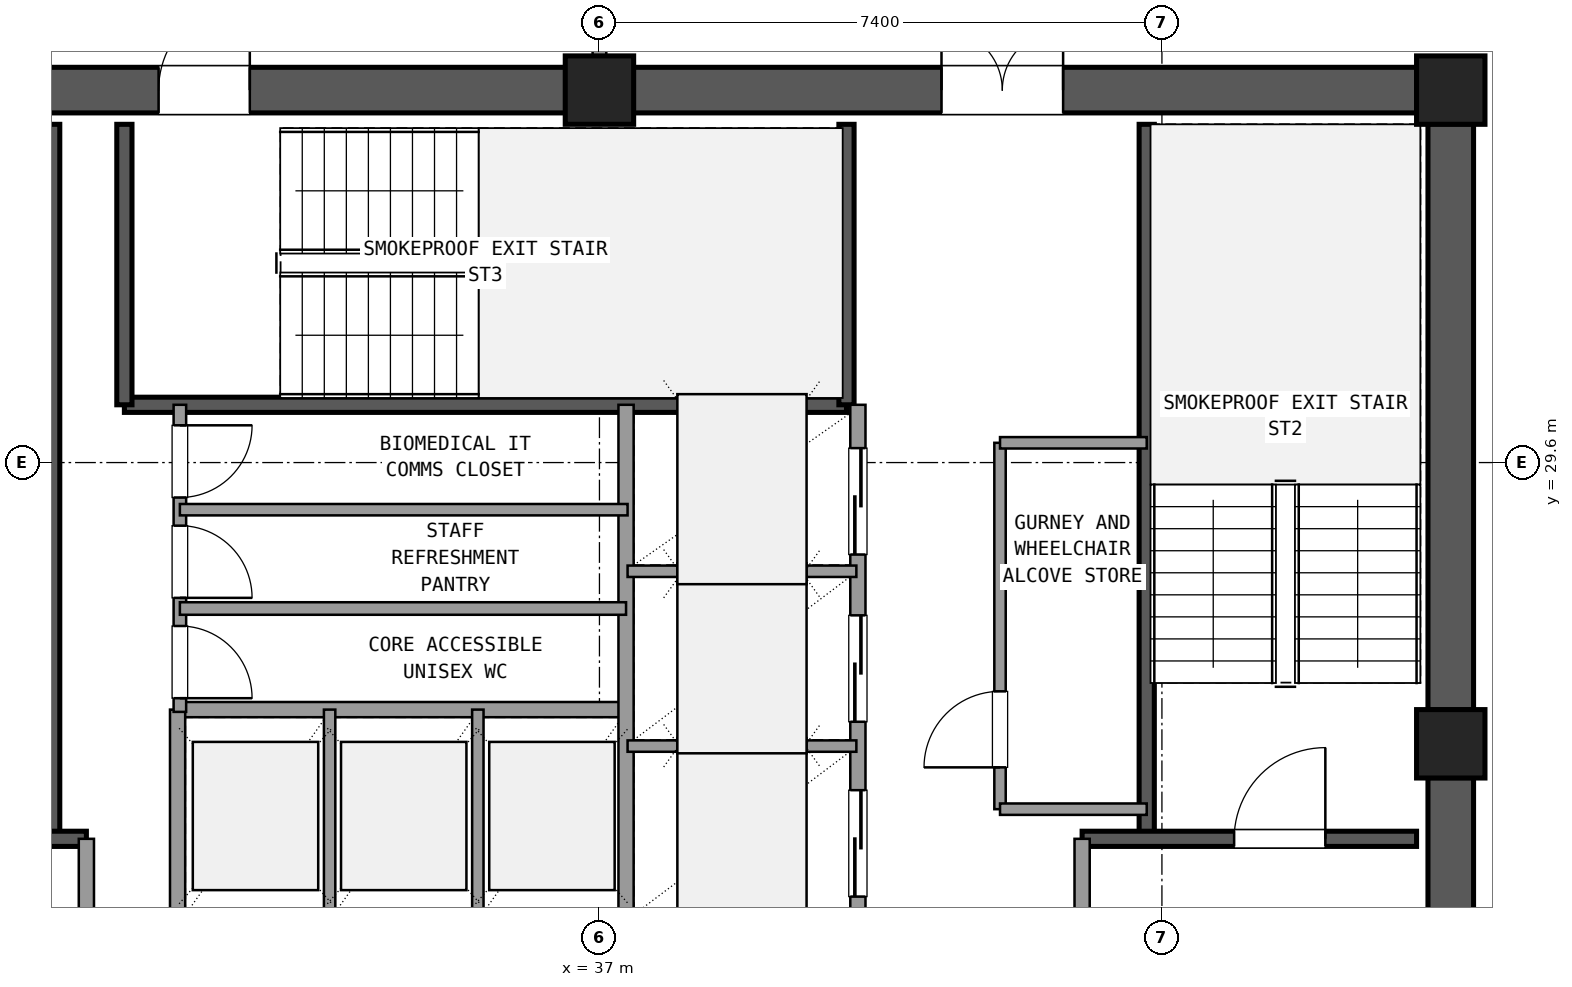
"""IFC4 building model, lengths in metres.
Left out: names, types, materials, properties, quantities, classifications, styles, units other than length and angle.
Written with IfcOpenShell. Run it as: python <this file> out.ifc"""

import sys

from ifc_helpers import new_model, si_unit, direction, frame, frame_2d, origin, origin_2d, place, context, subcontext, project, spatial, rectangle, extrude, element, fill, save


model = new_model("IFC4")
c1 = context("Model", 3, precision=1e-05, world=origin(), true_north=direction((0.0, 1.0)))
c2 = subcontext(c1, "Body", "Model", "MODEL_VIEW")
j1 = project(units=[si_unit("LENGTHUNIT", "METRE"), si_unit("PLANEANGLEUNIT", "RADIAN")], contexts=[c1])
p1 = place(None, origin())
s1 = spatial("IfcSite", under=j1, at=p1, CompositionType="ELEMENT")
p2 = place(p1, origin())
s2 = spatial("IfcBuilding", under=s1, at=p2, CompositionType="ELEMENT")
p3 = place(p2, frame((0.0, 0.0, 246.42)))
s3 = spatial("IfcBuildingStorey", under=s2, at=p3, CompositionType="ELEMENT", Elevation=246.42)
for number, where, z_axis, x_axis in (
    (1, (48.2, 25.9, 0.0), (0.0, 0.0, 1.0), (1.0, 0.0, 0.0)),
    (2, (48.2, 34.5, 0.0), (0.0, 0.0, 1.0), (1.0, 0.0, 0.0)),
    (3, (37.0, 34.5, 0.0), (0.0, 0.0, 1.0), (1.0, 0.0, 0.0)),
):
    element("IfcColumn", number, at=place(p3, frame(where, z_axis=z_axis, x_axis=x_axis)), inside=s3, PredefinedType="COLUMN", context=c2, shape_type="SweptSolid", body=[
        extrude(rectangle(XDim=0.9, YDim=0.9, at=origin_2d()), origin(), (0.0, 0.0, 1.0), 3.6),
    ])
p4 = place(p3, frame((48.2, 17.745, 0.0), z_axis=(0.0, 0.0, 1.0), x_axis=(0.0, 1.0, 0.0)))
e4 = element("IfcWall", 4, at=p4, inside=s3, PredefinedType="SHEAR", context=c2, shape_type="SweptSolid", body=[
    extrude(rectangle(XDim=7.71, YDim=0.6, at=frame_2d((3.855, 0.0))), origin(), (0.0, 0.0, 1.0), 3.32),
])
p5 = place(p4, frame((4.305, 0.0, 0.0)))
e5 = element("IfcOpeningElement", 5, at=p5, cuts=e4, PredefinedType="OPENING", context=c2, shape_type="SweptSolid", body=[
    extrude(rectangle(XDim=1.2, YDim=2.15, at=frame_2d((0.6, 1.075))), frame((0.0, 0.31, 0.0), z_axis=(0.0, -1.0, 0.0), x_axis=(1.0, 0.0, 0.0)), (0.0, 0.0, 1.0), 0.62),
])
p6 = place(p3, frame((48.2, 26.345, 0.0), z_axis=(0.0, 0.0, 1.0), x_axis=(0.0, 1.0, 0.0)))
e6 = element("IfcWall", 6, at=p6, inside=s3, PredefinedType="SHEAR", context=c2, shape_type="SweptSolid", body=[
    extrude(rectangle(XDim=7.71, YDim=0.6, at=frame_2d((3.855, 0.0))), origin(), (0.0, 0.0, 1.0), 3.32),
])
p7 = place(p3, frame((47.755, 34.5, 0.0), z_axis=(0.0, 0.0, 1.0), x_axis=(-1.0, 0.0, 0.0)))
e7 = element("IfcWall", 7, at=p7, inside=s3, PredefinedType="SHEAR", context=c2, shape_type="SweptSolid", body=[
    extrude(rectangle(XDim=10.31, YDim=0.6, at=frame_2d((5.155, 0.0))), origin(), (0.0, 0.0, 1.0), 3.32),
])
p8 = place(p7, frame((4.655, 0.0, 0.0)))
e8 = element("IfcOpeningElement", 8, at=p8, cuts=e7, PredefinedType="OPENING", context=c2, shape_type="SweptSolid", body=[
    extrude(rectangle(XDim=1.6, YDim=2.2, at=frame_2d((0.8, 1.1))), frame((0.0, 0.31, 0.0), z_axis=(0.0, -1.0, 0.0), x_axis=(1.0, 0.0, 0.0)), (0.0, 0.0, 1.0), 0.62),
])
p9 = place(p3, frame((36.555, 34.5, 0.0), z_axis=(0.0, 0.0, 1.0), x_axis=(-1.0, 0.0, 0.0)))
e9 = element("IfcWall", 9, at=p9, inside=s3, PredefinedType="SHEAR", context=c2, shape_type="SweptSolid", body=[
    extrude(rectangle(XDim=10.31, YDim=0.6, at=frame_2d((5.155, 0.0))), origin(), (0.0, 0.0, 1.0), 3.32),
])
p10 = place(p9, frame((4.155, 0.0, 0.0)))
e10 = element("IfcOpeningElement", 10, at=p10, cuts=e9, PredefinedType="OPENING", context=c2, shape_type="SweptSolid", body=[
    extrude(rectangle(XDim=1.2, YDim=2.15, at=frame_2d((0.6, 1.075))), frame((0.0, 0.31, 0.0), z_axis=(0.0, -1.0, 0.0), x_axis=(1.0, 0.0, 0.0)), (0.0, 0.0, 1.0), 0.62),
])
p11 = place(p3, frame((29.8, 24.65, 0.0), z_axis=(0.0, 0.0, 1.0), x_axis=(0.0, 1.0, 0.0)))
e11 = element("IfcWall", 11, at=p11, inside=s3, PredefinedType="SHEAR", context=c2, shape_type="SweptSolid", body=[
    extrude(rectangle(XDim=9.4, YDim=0.2, at=frame_2d((4.7, 0.0))), origin(), (0.0, 0.0, 1.0), 3.32),
])
p12 = place(p3, frame((26.25, 24.65, 0.0), z_axis=(0.0, 0.0, 1.0), x_axis=(1.0, 0.0, 0.0)))
e12 = element("IfcWall", 12, at=p12, inside=s3, PredefinedType="SHEAR", context=c2, shape_type="SweptSolid", body=[
    extrude(rectangle(XDim=4.0, YDim=0.2, at=frame_2d((2.0, 0.0))), origin(), (0.0, 0.0, 1.0), 3.32),
])
p13 = place(p12, frame((1.0, 0.0, 0.0)))
e13 = element("IfcOpeningElement", 13, at=p13, cuts=e12, PredefinedType="OPENING", context=c2, shape_type="SweptSolid", body=[
    extrude(rectangle(XDim=1.2, YDim=2.15, at=frame_2d((0.6, 1.075))), frame((0.0, 0.11, 0.0), z_axis=(0.0, -1.0, 0.0), x_axis=(1.0, 0.0, 0.0)), (0.0, 0.0, 1.0), 0.22),
])
p14 = place(p3, frame((44.2, 24.65, 0.0), z_axis=(0.0, 0.0, 1.0), x_axis=(0.0, 1.0, 0.0)))
e14 = element("IfcWall", 14, at=p14, inside=s3, PredefinedType="SHEAR", context=c2, shape_type="SweptSolid", body=[
    extrude(rectangle(XDim=9.4, YDim=0.2, at=frame_2d((4.7, 0.0))), origin(), (0.0, 0.0, 1.0), 3.32),
])
p15 = place(p3, frame((43.35, 24.65, 0.0), z_axis=(0.0, 0.0, 1.0), x_axis=(1.0, 0.0, 0.0)))
e15 = element("IfcWall", 15, at=p15, inside=s3, PredefinedType="SHEAR", context=c2, shape_type="SweptSolid", body=[
    extrude(rectangle(XDim=4.4, YDim=0.2, at=frame_2d((2.2, 0.0))), origin(), (0.0, 0.0, 1.0), 3.32),
])
p16 = place(p15, frame((2.0, 0.0, 0.0)))
e16 = element("IfcOpeningElement", 16, at=p16, cuts=e15, PredefinedType="OPENING", context=c2, shape_type="SweptSolid", body=[
    extrude(rectangle(XDim=1.2, YDim=2.15, at=frame_2d((0.6, 1.075))), frame((0.0, 0.11, 0.0), z_axis=(0.0, -1.0, 0.0), x_axis=(1.0, 0.0, 0.0)), (0.0, 0.0, 1.0), 0.22),
])
p17 = place(p3, frame((30.75, 30.36, 0.0), z_axis=(0.0, 0.0, 1.0), x_axis=(1.0, 0.0, 0.0)))
e17 = element("IfcWall", 17, at=p17, inside=s3, PredefinedType="SHEAR", context=c2, shape_type="SweptSolid", body=[
    extrude(rectangle(XDim=9.5, YDim=0.2, at=frame_2d((4.75, 0.0))), origin(), (0.0, 0.0, 1.0), 3.32),
])
for number, where, z_axis, x_axis in (
    (18, (30.75, 30.36, 0.0), (0.0, 0.0, 1.0), (0.0, 1.0, 0.0)),
    (19, (40.25, 30.36, 0.0), (0.0, 0.0, 1.0), (0.0, 1.0, 0.0)),
):
    element("IfcWall", number, at=place(p3, frame(where, z_axis=z_axis, x_axis=x_axis)), inside=s3, PredefinedType="SHEAR", context=c2, shape_type="SweptSolid", body=[
        extrude(rectangle(XDim=3.69, YDim=0.2, at=frame_2d((1.845, 0.0))), origin(), (0.0, 0.0, 1.0), 3.32),
    ])
p18 = place(p3, frame((30.25, 17.75, 0.0), z_axis=(0.0, 0.0, 1.0), x_axis=(0.0, 1.0, 0.0)))
e20 = element("IfcWall", 20, at=p18, inside=s3, PredefinedType="SOLIDWALL", context=c2, shape_type="SweptSolid", body=[
    extrude(rectangle(XDim=6.9, YDim=0.2, at=frame_2d((3.45, 0.0))), origin(), (0.0, 0.0, 1.0), 2.61),
])
p19 = place(p18, frame((4.15, 0.0, 0.0)))
e21 = element("IfcOpeningElement", 21, at=p19, cuts=e20, PredefinedType="OPENING", context=c2, shape_type="SweptSolid", body=[
    extrude(rectangle(XDim=1.2, YDim=2.15, at=frame_2d((0.6, 1.075))), frame((0.0, 0.11, 0.0), z_axis=(0.0, -1.0, 0.0), x_axis=(1.0, 0.0, 0.0)), (0.0, 0.0, 1.0), 0.22),
])
p20 = place(p3, frame((43.35, 17.75, 0.0), z_axis=(0.0, 0.0, 1.0), x_axis=(0.0, 1.0, 0.0)))
e22 = element("IfcWall", 22, at=p20, inside=s3, PredefinedType="SOLIDWALL", context=c2, shape_type="SweptSolid", body=[
    extrude(rectangle(XDim=6.9, YDim=0.2, at=frame_2d((3.45, 0.0))), origin(), (0.0, 0.0, 1.0), 2.61),
])
p21 = place(p20, frame((4.15, 0.0, 0.0)))
e23 = element("IfcOpeningElement", 23, at=p21, cuts=e22, PredefinedType="OPENING", context=c2, shape_type="SweptSolid", body=[
    extrude(rectangle(XDim=1.2, YDim=2.15, at=frame_2d((0.6, 1.075))), frame((0.0, 0.11, 0.0), z_axis=(0.0, -1.0, 0.0), x_axis=(1.0, 0.0, 0.0)), (0.0, 0.0, 1.0), 0.22),
])
p22 = place(p3, frame((31.45, 26.35, 0.0), z_axis=(0.0, 0.0, 1.0), x_axis=(1.0, 0.0, 0.0)))
e24 = element("IfcWall", 24, at=p22, inside=s3, PredefinedType="SOLIDWALL", context=c2, shape_type="SweptSolid", body=[
    extrude(rectangle(XDim=5.9, YDim=0.2, at=frame_2d((2.95, 0.0))), origin(), (0.0, 0.0, 1.0), 2.61),
])
p23 = place(p3, frame((31.45, 23.54, 0.0), z_axis=(0.0, 0.0, 1.0), x_axis=(0.0, 1.0, 0.0)))
e25 = element("IfcWall", 25, at=p23, inside=s3, PredefinedType="SOLIDWALL", context=c2, shape_type="SweptSolid", body=[
    extrude(rectangle(XDim=2.81, YDim=0.2, at=frame_2d((1.405, 0.0))), origin(), (0.0, 0.0, 1.0), 2.61),
])
for number, where, z_axis, x_axis in (
    (26, (33.45, 23.54, 0.0), (0.0, 0.0, 1.0), (0.0, 1.0, 0.0)),
    (27, (35.4, 23.54, 0.0), (0.0, 0.0, 1.0), (0.0, 1.0, 0.0)),
):
    element("IfcWall", number, at=place(p3, frame(where, z_axis=z_axis, x_axis=x_axis)), inside=s3, PredefinedType="PARTITIONING", context=c2, shape_type="SweptSolid", body=[
        extrude(rectangle(XDim=2.81, YDim=0.15, at=frame_2d((1.405, 0.0))), origin(), (0.0, 0.0, 1.0), 2.61),
    ])
p24 = place(p3, frame((37.35, 23.54, 0.0), z_axis=(0.0, 0.0, 1.0), x_axis=(0.0, 1.0, 0.0)))
e28 = element("IfcWall", 28, at=p24, inside=s3, PredefinedType="SOLIDWALL", context=c2, shape_type="SweptSolid", body=[
    extrude(rectangle(XDim=6.82, YDim=0.2, at=frame_2d((3.41, 0.0))), origin(), (0.0, 0.0, 1.0), 2.61),
])
p25 = place(p3, frame((40.4, 23.54, 0.0), z_axis=(0.0, 0.0, 1.0), x_axis=(0.0, 1.0, 0.0)))
e29 = element("IfcWall", 29, at=p25, inside=s3, PredefinedType="SOLIDWALL", context=c2, shape_type="SweptSolid", body=[
    extrude(rectangle(XDim=6.82, YDim=0.2, at=frame_2d((3.41, 0.0))), origin(), (0.0, 0.0, 1.0), 2.61),
])
p26 = place(p25, frame((0.35, 0.0, 0.0)))
e30 = element("IfcOpeningElement", 30, at=p26, cuts=e29, PredefinedType="OPENING", context=c2, shape_type="SweptSolid", body=[
    extrude(rectangle(XDim=1.4, YDim=2.2, at=frame_2d((0.7, 1.1))), frame((0.0, 0.11, 0.0), z_axis=(0.0, -1.0, 0.0), x_axis=(1.0, 0.0, 0.0)), (0.0, 0.0, 1.0), 0.22),
])
p27 = place(p25, frame((2.65, 0.0, 0.0)))
e31 = element("IfcOpeningElement", 31, at=p27, cuts=e29, PredefinedType="OPENING", context=c2, shape_type="SweptSolid", body=[
    extrude(rectangle(XDim=1.4, YDim=2.2, at=frame_2d((0.7, 1.1))), frame((0.0, 0.11, 0.0), z_axis=(0.0, -1.0, 0.0), x_axis=(1.0, 0.0, 0.0)), (0.0, 0.0, 1.0), 0.22),
])
p28 = place(p25, frame((4.85, 0.0, 0.0)))
e32 = element("IfcOpeningElement", 32, at=p28, cuts=e29, PredefinedType="OPENING", context=c2, shape_type="SweptSolid", body=[
    extrude(rectangle(XDim=1.4, YDim=2.2, at=frame_2d((0.7, 1.1))), frame((0.0, 0.11, 0.0), z_axis=(0.0, -1.0, 0.0), x_axis=(1.0, 0.0, 0.0)), (0.0, 0.0, 1.0), 0.22),
])
for number, where, z_axis, x_axis in (
    (33, (37.37, 25.87, 0.0), (0.0, 0.0, 1.0), (1.0, 0.0, 0.0)),
    (34, (37.37, 28.17, 0.0), (0.0, 0.0, 1.0), (1.0, 0.0, 0.0)),
):
    element("IfcWall", number, at=place(p3, frame(where, z_axis=z_axis, x_axis=x_axis)), inside=s3, PredefinedType="PARTITIONING", context=c2, shape_type="SweptSolid", body=[
        extrude(rectangle(XDim=3.01, YDim=0.15, at=frame_2d((1.505, 0.0))), origin(), (0.0, 0.0, 1.0), 2.61),
    ])
p29 = place(p3, frame((42.27, 25.04, 0.0), z_axis=(0.0, 0.0, 1.0), x_axis=(0.0, 1.0, 0.0)))
e35 = element("IfcWall", 35, at=p29, inside=s3, PredefinedType="PARTITIONING", context=c2, shape_type="SweptSolid", body=[
    extrude(rectangle(XDim=4.82, YDim=0.15, at=frame_2d((2.41, 0.0))), origin(), (0.0, 0.0, 1.0), 2.61),
])
p30 = place(p29, frame((0.55, 0.0, 0.0)))
e36 = element("IfcOpeningElement", 36, at=p30, cuts=e35, PredefinedType="OPENING", context=c2, shape_type="SweptSolid", body=[
    extrude(rectangle(XDim=1.0, YDim=2.15, at=frame_2d((0.5, 1.075))), frame((0.0, 0.085, 0.0), z_axis=(0.0, -1.0, 0.0), x_axis=(1.0, 0.0, 0.0)), (0.0, 0.0, 1.0), 0.17),
])
for number, where, z_axis, x_axis in (
    (37, (42.27, 25.04, 0.0), (0.0, 0.0, 1.0), (1.0, 0.0, 0.0)),
    (38, (42.27, 29.86, 0.0), (0.0, 0.0, 1.0), (1.0, 0.0, 0.0)),
):
    element("IfcWall", number, at=place(p3, frame(where, z_axis=z_axis, x_axis=x_axis)), inside=s3, PredefinedType="PARTITIONING", context=c2, shape_type="SweptSolid", body=[
        extrude(rectangle(XDim=1.93, YDim=0.15, at=frame_2d((0.965, 0.0))), origin(), (0.0, 0.0, 1.0), 2.61),
    ])
p31 = place(p3, frame((31.48, 26.32, 0.0), z_axis=(0.0, 0.0, 1.0), x_axis=(0.0, 1.0, 0.0)))
e39 = element("IfcWall", 39, at=p31, inside=s3, PredefinedType="PLUMBINGWALL", context=c2, shape_type="SweptSolid", body=[
    extrude(rectangle(XDim=4.04, YDim=0.165, at=frame_2d((2.02, 0.0))), origin(), (0.0, 0.0, 1.0), 2.61),
])
p32 = place(p31, frame((0.18, 0.0, 0.0)))
e40 = element("IfcOpeningElement", 40, at=p32, cuts=e39, PredefinedType="OPENING", context=c2, shape_type="SweptSolid", body=[
    extrude(rectangle(XDim=0.95, YDim=2.1, at=frame_2d((0.475, 1.05))), frame((0.0, 0.093, 0.0), z_axis=(0.0, -1.0, 0.0), x_axis=(1.0, 0.0, 0.0)), (0.0, 0.0, 1.0), 0.185),
])
p33 = place(p31, frame((1.5, 0.0, 0.0)))
e41 = element("IfcOpeningElement", 41, at=p33, cuts=e39, PredefinedType="OPENING", context=c2, shape_type="SweptSolid", body=[
    extrude(rectangle(XDim=0.95, YDim=2.1, at=frame_2d((0.475, 1.05))), frame((0.0, 0.093, 0.0), z_axis=(0.0, -1.0, 0.0), x_axis=(1.0, 0.0, 0.0)), (0.0, 0.0, 1.0), 0.185),
])
p34 = place(p31, frame((2.82, 0.0, 0.0)))
e42 = element("IfcOpeningElement", 42, at=p34, cuts=e39, PredefinedType="OPENING", context=c2, shape_type="SweptSolid", body=[
    extrude(rectangle(XDim=0.95, YDim=2.1, at=frame_2d((0.475, 1.05))), frame((0.0, 0.093, 0.0), z_axis=(0.0, -1.0, 0.0), x_axis=(1.0, 0.0, 0.0)), (0.0, 0.0, 1.0), 0.185),
])
p35 = place(p3, frame((31.48, 27.68, 0.0), z_axis=(0.0, 0.0, 1.0), x_axis=(1.0, 0.0, 0.0)))
e43 = element("IfcWall", 43, at=p35, inside=s3, PredefinedType="PLUMBINGWALL", context=c2, shape_type="SweptSolid", body=[
    extrude(rectangle(XDim=5.87, YDim=0.165, at=frame_2d((2.935, 0.0))), origin(), (0.0, 0.0, 1.0), 2.61),
])
p36 = place(p3, frame((31.48, 28.98, 0.0), z_axis=(0.0, 0.0, 1.0), x_axis=(1.0, 0.0, 0.0)))
e44 = element("IfcWall", 44, at=p36, inside=s3, PredefinedType="PARTITIONING", context=c2, shape_type="SweptSolid", body=[
    extrude(rectangle(XDim=5.89, YDim=0.15, at=frame_2d((2.945, 0.0))), origin(), (0.0, 0.0, 1.0), 2.61),
])
p37 = place(p3, frame((37.0, 34.95, 0.0), z_axis=(0.0, 0.0, 1.0), x_axis=(0.0, 1.0, 0.0)))
e45 = element("IfcWall", 45, at=p37, inside=s3, PredefinedType="PARTITIONING", context=c2, shape_type="SweptSolid", body=[
    extrude(rectangle(XDim=2.7, YDim=0.18, at=frame_2d((1.35, 0.0))), origin(), (0.0, 0.0, 1.0), 2.61),
])
p38 = place(p37, frame((0.35, 0.0, 0.0)))
e46 = element("IfcOpeningElement", 46, at=p38, cuts=e45, PredefinedType="OPENING", context=c2, shape_type="SweptSolid", body=[
    extrude(rectangle(XDim=2.0, YDim=2.2, at=frame_2d((1.0, 1.1))), frame((0.0, 0.1, 0.0), z_axis=(0.0, -1.0, 0.0), x_axis=(1.0, 0.0, 0.0)), (0.0, 0.0, 1.0), 0.2),
])
p39 = place(p16, origin())
e47 = element("IfcDoor", 47, at=p39, inside=s3, OperationType="SINGLE_SWING_RIGHT", PredefinedType="DOOR", context=c2, shape_type="SweptSolid", body=[
    extrude(rectangle(XDim=1.2, YDim=2.15, at=frame_2d((0.6, 1.075))), frame((0.0, 0.025, 0.0), z_axis=(0.0, -1.0, 0.0), x_axis=(1.0, 0.0, 0.0)), (0.0, 0.0, 1.0), 0.05),
])
fill(e16, e47)
p40 = place(p8, frame((1.6, 0.0, 0.0), z_axis=(0.0, 0.0, 1.0), x_axis=(-1.0, 0.0, 0.0)))
e48 = element("IfcDoor", 48, at=p40, inside=s3, OperationType="DOUBLE_DOOR_SINGLE_SWING", PredefinedType="DOOR", context=c2, shape_type="SweptSolid", body=[
    extrude(rectangle(XDim=1.6, YDim=2.2, at=frame_2d((0.8, 1.1))), frame((0.0, 0.025, 0.0), z_axis=(0.0, -1.0, 0.0), x_axis=(1.0, 0.0, 0.0)), (0.0, 0.0, 1.0), 0.05),
])
fill(e8, e48)
p41 = place(p10, frame((1.2, 0.0, 0.0), z_axis=(0.0, 0.0, 1.0), x_axis=(-1.0, 0.0, 0.0)))
e49 = element("IfcDoor", 49, at=p41, inside=s3, OperationType="SINGLE_SWING_LEFT", PredefinedType="DOOR", context=c2, shape_type="SweptSolid", body=[
    extrude(rectangle(XDim=1.2, YDim=2.15, at=frame_2d((0.6, 1.075))), frame((0.0, 0.025, 0.0), z_axis=(0.0, -1.0, 0.0), x_axis=(1.0, 0.0, 0.0)), (0.0, 0.0, 1.0), 0.05),
])
fill(e10, e49)
p42 = place(p26, origin())
e50 = element("IfcDoor", 50, at=p42, inside=s3, OperationType="SLIDING_TO_LEFT", PredefinedType="DOOR", context=c2, shape_type="SweptSolid", body=[
    extrude(rectangle(XDim=1.4, YDim=2.2, at=frame_2d((0.7, 1.1))), frame((0.0, 0.025, 0.0), z_axis=(0.0, -1.0, 0.0), x_axis=(1.0, 0.0, 0.0)), (0.0, 0.0, 1.0), 0.05),
])
fill(e30, e50)
p43 = place(p27, origin())
e51 = element("IfcDoor", 51, at=p43, inside=s3, OperationType="SLIDING_TO_LEFT", PredefinedType="DOOR", context=c2, shape_type="SweptSolid", body=[
    extrude(rectangle(XDim=1.4, YDim=2.2, at=frame_2d((0.7, 1.1))), frame((0.0, 0.025, 0.0), z_axis=(0.0, -1.0, 0.0), x_axis=(1.0, 0.0, 0.0)), (0.0, 0.0, 1.0), 0.05),
])
fill(e31, e51)
p44 = place(p28, origin())
e52 = element("IfcDoor", 52, at=p44, inside=s3, OperationType="SLIDING_TO_RIGHT", PredefinedType="DOOR", context=c2, shape_type="SweptSolid", body=[
    extrude(rectangle(XDim=1.4, YDim=2.2, at=frame_2d((0.7, 1.1))), frame((0.0, 0.025, 0.0), z_axis=(0.0, -1.0, 0.0), x_axis=(1.0, 0.0, 0.0)), (0.0, 0.0, 1.0), 0.05),
])
fill(e32, e52)
p45 = place(p30, origin())
e53 = element("IfcDoor", 53, at=p45, inside=s3, OperationType="SINGLE_SWING_LEFT", PredefinedType="DOOR", context=c2, shape_type="SweptSolid", body=[
    extrude(rectangle(XDim=1.0, YDim=2.15, at=frame_2d((0.5, 1.075))), frame((0.0, 0.025, 0.0), z_axis=(0.0, -1.0, 0.0), x_axis=(1.0, 0.0, 0.0)), (0.0, 0.0, 1.0), 0.05),
])
fill(e36, e53)
p46 = place(p32, frame((0.95, 0.0, 0.0), z_axis=(0.0, 0.0, 1.0), x_axis=(-1.0, 0.0, 0.0)))
e54 = element("IfcDoor", 54, at=p46, inside=s3, OperationType="SINGLE_SWING_LEFT", PredefinedType="DOOR", context=c2, shape_type="SweptSolid", body=[
    extrude(rectangle(XDim=0.95, YDim=2.1, at=frame_2d((0.475, 1.05))), frame((0.0, 0.025, 0.0), z_axis=(0.0, -1.0, 0.0), x_axis=(1.0, 0.0, 0.0)), (0.0, 0.0, 1.0), 0.05),
])
fill(e40, e54)
p47 = place(p33, frame((0.95, 0.0, 0.0), z_axis=(0.0, 0.0, 1.0), x_axis=(-1.0, 0.0, 0.0)))
e55 = element("IfcDoor", 55, at=p47, inside=s3, OperationType="SINGLE_SWING_LEFT", PredefinedType="DOOR", context=c2, shape_type="SweptSolid", body=[
    extrude(rectangle(XDim=0.95, YDim=2.1, at=frame_2d((0.475, 1.05))), frame((0.0, 0.025, 0.0), z_axis=(0.0, -1.0, 0.0), x_axis=(1.0, 0.0, 0.0)), (0.0, 0.0, 1.0), 0.05),
])
fill(e41, e55)
p48 = place(p34, frame((0.95, 0.0, 0.0), z_axis=(0.0, 0.0, 1.0), x_axis=(-1.0, 0.0, 0.0)))
e56 = element("IfcDoor", 56, at=p48, inside=s3, OperationType="SINGLE_SWING_RIGHT", PredefinedType="DOOR", context=c2, shape_type="SweptSolid", body=[
    extrude(rectangle(XDim=0.95, YDim=2.1, at=frame_2d((0.475, 1.05))), frame((0.0, 0.025, 0.0), z_axis=(0.0, -1.0, 0.0), x_axis=(1.0, 0.0, 0.0)), (0.0, 0.0, 1.0), 0.05),
])
fill(e42, e56)
save(model, sys.argv[1])
